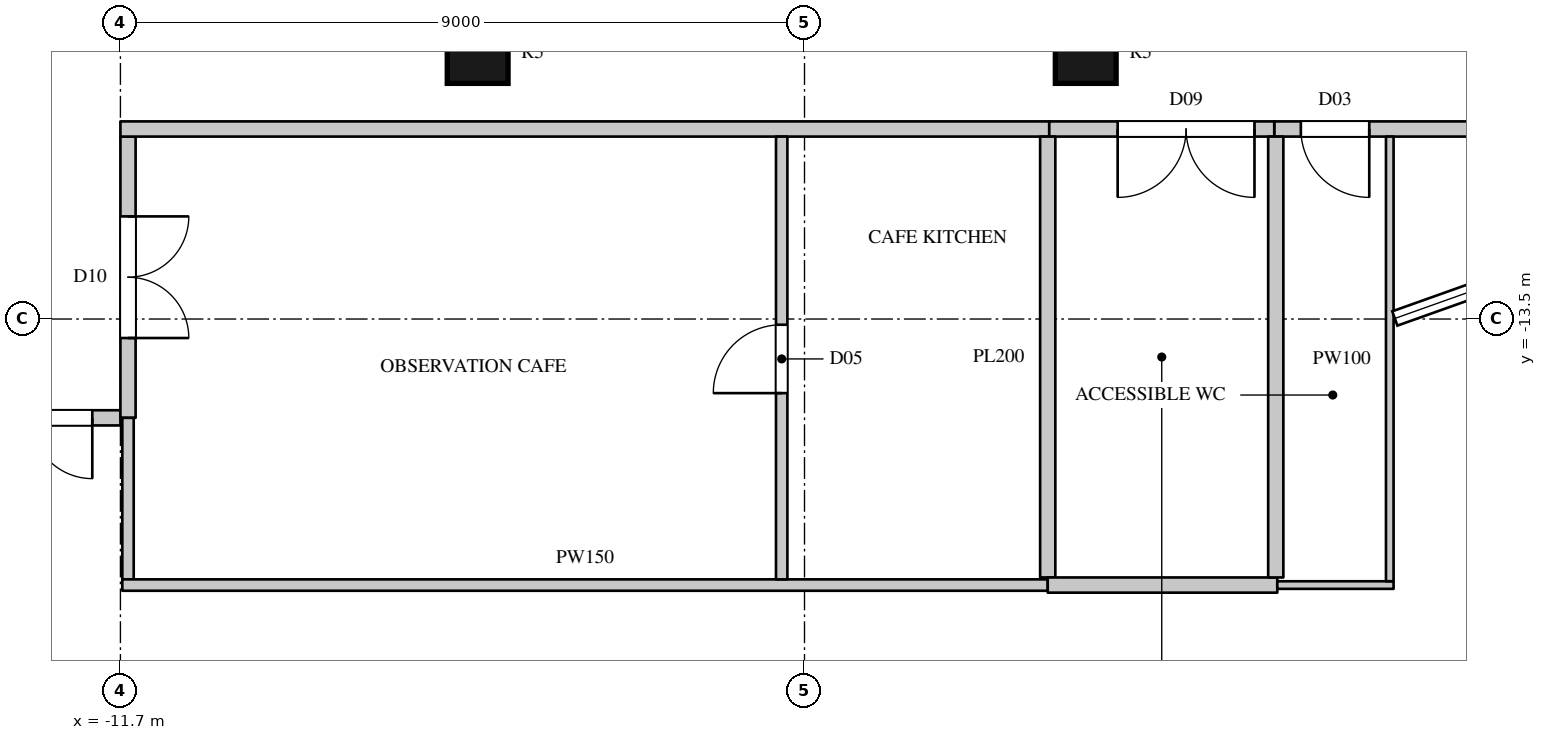
"""IFC4 building model, lengths in metres.
Left out: names, types, materials, properties, quantities, classifications, styles, units other than length and angle.
Written with IfcOpenShell. Run it as: python <this file> out.ifc"""

import sys

from ifc_helpers import new_model, si_unit, direction, frame, frame_2d, origin, origin_2d, place, context, subcontext, project, spatial, rectangle, circle, extrude, element, fill, save


model = new_model("IFC4")
c1 = context("Model", 3, precision=1e-05, world=origin(), true_north=direction((0.0, 1.0)))
c2 = subcontext(c1, "Body", "Model", "MODEL_VIEW")
j1 = project(units=[si_unit("LENGTHUNIT", "METRE"), si_unit("PLANEANGLEUNIT", "RADIAN")], contexts=[c1])
p1 = place(None, origin())
s1 = spatial("IfcSite", under=j1, at=p1, CompositionType="ELEMENT")
p2 = place(p1, origin())
s2 = spatial("IfcBuilding", under=s1, at=p2, CompositionType="ELEMENT")
p3 = place(p2, frame((0.0, 0.0, 329.5)))
s3 = spatial("IfcBuildingStorey", under=s2, at=p3, CompositionType="ELEMENT", Elevation=329.5)
for number, where, z_axis, x_axis in (
    (1, (-7.0, -10.0, 0.0), (0.0, 0.0, 1.0), (1.0, 0.0, 0.0)),
    (2, (1.0, -10.0, 0.0), (0.0, 0.0, 1.0), (1.0, 0.0, 0.0)),
):
    element("IfcColumn", number, at=place(p3, frame(where, z_axis=z_axis, x_axis=x_axis)), inside=s3, PredefinedType="COLUMN", context=c2, shape_type="SweptSolid", body=[
        extrude(circle(Radius=0.4, at=origin_2d()), origin(), (0.0, 0.0, 1.0), 5.5),
    ])
p4 = place(p3, frame((-13.97, -14.8, 0.0), z_axis=(0.0, 0.0, 1.0), x_axis=(1.0, 0.0, 0.0)))
e3 = element("IfcWall", 3, at=p4, inside=s3, PredefinedType="PARTITIONING", context=c2, shape_type="SweptSolid", body=[
    extrude(rectangle(XDim=2.27, YDim=0.2, at=frame_2d((1.135, 0.0))), origin(), (0.0, 0.0, 1.0), 5.098),
])
p5 = place(p4, frame((0.3, 0.0, 0.0)))
e4 = element("IfcOpeningElement", 4, at=p5, cuts=e3, PredefinedType="OPENING", context=c2, shape_type="SweptSolid", body=[
    extrude(rectangle(XDim=1.6, YDim=2.4, at=frame_2d((0.8, 1.2))), frame((0.0, 0.11, 0.0), z_axis=(0.0, -1.0, 0.0), x_axis=(1.0, 0.0, 0.0)), (0.0, 0.0, 1.0), 0.22),
])
p6 = place(p3, frame((-11.6, -14.8, 0.0), z_axis=(0.0, 0.0, 1.0), x_axis=(0.0, 1.0, 0.0)))
e5 = element("IfcWall", 5, at=p6, inside=s3, PredefinedType="PARTITIONING", context=c2, shape_type="SweptSolid", body=[
    extrude(rectangle(XDim=3.7, YDim=0.2, at=frame_2d((1.85, 0.0))), origin(), (0.0, 0.0, 1.0), 5.098),
])
p7 = place(p6, frame((1.05, 0.0, 0.0)))
e6 = element("IfcOpeningElement", 6, at=p7, cuts=e5, PredefinedType="OPENING", context=c2, shape_type="SweptSolid", body=[
    extrude(rectangle(XDim=1.6, YDim=2.4, at=frame_2d((0.8, 1.2))), frame((0.0, 0.11, 0.0), z_axis=(0.0, -1.0, 0.0), x_axis=(1.0, 0.0, 0.0)), (0.0, 0.0, 1.0), 0.22),
])
p8 = place(p3, frame((-11.7, -11.0, 0.0), z_axis=(0.0, 0.0, 1.0), x_axis=(1.0, 0.0, 0.0)))
e7 = element("IfcWall", 7, at=p8, inside=s3, PredefinedType="PARTITIONING", context=c2, shape_type="SweptSolid", body=[
    extrude(rectangle(XDim=12.22, YDim=0.2, at=frame_2d((6.11, 0.0))), origin(), (0.0, 0.0, 1.0), 5.098),
])
p9 = place(p3, frame((3.48, -11.0, 0.0), z_axis=(0.0, 0.0, 1.0), x_axis=(1.0, 0.0, 0.0)))
e8 = element("IfcWall", 8, at=p9, inside=s3, PredefinedType="PARTITIONING", context=c2, shape_type="SweptSolid", body=[
    extrude(rectangle(XDim=6.62, YDim=0.2, at=frame_2d((3.31, 0.0))), origin(), (0.0, 0.0, 1.0), 5.098),
])
p10 = place(p9, frame((0.35, 0.0, 0.0)))
e9 = element("IfcOpeningElement", 9, at=p10, cuts=e8, PredefinedType="OPENING", context=c2, shape_type="SweptSolid", body=[
    extrude(rectangle(XDim=0.9, YDim=2.2, at=frame_2d((0.45, 1.1))), frame((0.0, 0.11, 0.0), z_axis=(0.0, -1.0, 0.0), x_axis=(1.0, 0.0, 0.0)), (0.0, 0.0, 1.0), 0.22),
])
p11 = place(p3, frame((-11.6, -16.925, 0.0), z_axis=(0.0, 0.0, 1.0), x_axis=(0.0, 1.0, 0.0)))
e10 = element("IfcWall", 10, at=p11, inside=s3, PredefinedType="PARTITIONING", context=c2, shape_type="SweptSolid", body=[
    extrude(rectangle(XDim=2.125, YDim=0.15, at=frame_2d((1.062, 0.0))), origin(), (0.0, 0.0, 1.0), 5.098),
])
p12 = place(p3, frame((-11.675, -17.0, 0.0), z_axis=(0.0, 0.0, 1.0), x_axis=(1.0, 0.0, 0.0)))
e11 = element("IfcWall", 11, at=p12, inside=s3, PredefinedType="PARTITIONING", context=c2, shape_type="SweptSolid", body=[
    extrude(rectangle(XDim=12.175, YDim=0.15, at=frame_2d((6.087, 0.0))), origin(), (0.0, 0.0, 1.0), 5.098),
])
p13 = place(p3, frame((-3.0, -16.925, 0.0), z_axis=(0.0, 0.0, 1.0), x_axis=(0.0, 1.0, 0.0)))
e12 = element("IfcWall", 12, at=p13, inside=s3, PredefinedType="PARTITIONING", context=c2, shape_type="SweptSolid", body=[
    extrude(rectangle(XDim=5.825, YDim=0.15, at=frame_2d((2.913, 0.0))), origin(), (0.0, 0.0, 1.0), 5.098),
])
p14 = place(p13, frame((2.45, 0.0, 0.0)))
e13 = element("IfcOpeningElement", 13, at=p14, cuts=e12, PredefinedType="OPENING", context=c2, shape_type="SweptSolid", body=[
    extrude(rectangle(XDim=0.9, YDim=2.2, at=frame_2d((0.45, 1.1))), frame((0.0, 0.085, 0.0), z_axis=(0.0, -1.0, 0.0), x_axis=(1.0, 0.0, 0.0)), (0.0, 0.0, 1.0), 0.17),
])
p15 = place(p3, frame((0.52, -11.0, 0.0), z_axis=(0.0, 0.0, 1.0), x_axis=(1.0, 0.0, 0.0)))
e14 = element("IfcWall", 14, at=p15, inside=s3, PredefinedType="PARTITIONING", context=c2, shape_type="SweptSolid", body=[
    extrude(rectangle(XDim=2.96, YDim=0.2, at=frame_2d((1.48, 0.0))), origin(), (0.0, 0.0, 1.0), 5.098),
])
p16 = place(p15, frame((0.9, 0.0, 0.0)))
e15 = element("IfcOpeningElement", 15, at=p16, cuts=e14, PredefinedType="OPENING", context=c2, shape_type="SweptSolid", body=[
    extrude(rectangle(XDim=1.8, YDim=2.4, at=frame_2d((0.9, 1.2))), frame((0.0, 0.11, 0.0), z_axis=(0.0, -1.0, 0.0), x_axis=(1.0, 0.0, 0.0)), (0.0, 0.0, 1.0), 0.22),
])
p17 = place(p3, frame((0.5, -16.9, 0.0), z_axis=(0.0, 0.0, 1.0), x_axis=(0.0, 1.0, 0.0)))
e16 = element("IfcWall", 16, at=p17, inside=s3, PredefinedType="PARTITIONING", context=c2, shape_type="SweptSolid", body=[
    extrude(rectangle(XDim=5.8, YDim=0.2, at=frame_2d((2.9, 0.0))), origin(), (0.0, 0.0, 1.0), 5.098),
])
p18 = place(p3, frame((0.5, -17.0, 0.0), z_axis=(0.0, 0.0, 1.0), x_axis=(1.0, 0.0, 0.0)))
e17 = element("IfcWall", 17, at=p18, inside=s3, PredefinedType="PARTITIONING", context=c2, shape_type="SweptSolid", body=[
    extrude(rectangle(XDim=3.02, YDim=0.2, at=frame_2d((1.51, 0.0))), origin(), (0.0, 0.0, 1.0), 5.098),
])
p19 = place(p3, frame((3.5, -16.9, 0.0), z_axis=(0.0, 0.0, 1.0), x_axis=(0.0, 1.0, 0.0)))
e18 = element("IfcWall", 18, at=p19, inside=s3, PredefinedType="PARTITIONING", context=c2, shape_type="SweptSolid", body=[
    extrude(rectangle(XDim=5.8, YDim=0.2, at=frame_2d((2.9, 0.0))), origin(), (0.0, 0.0, 1.0), 5.098),
])
p20 = place(p3, frame((3.52, -17.0, 0.0), z_axis=(0.0, 0.0, 1.0), x_axis=(1.0, 0.0, 0.0)))
e19 = element("IfcWall", 19, at=p20, inside=s3, PredefinedType="PARTITIONING", context=c2, shape_type="SweptSolid", body=[
    extrude(rectangle(XDim=1.53, YDim=0.1, at=frame_2d((0.765, 0.0))), origin(), (0.0, 0.0, 1.0), 5.098),
])
p21 = place(p3, frame((5.0, -16.95, 0.0), z_axis=(0.0, 0.0, 1.0), x_axis=(0.0, 1.0, 0.0)))
e20 = element("IfcWall", 20, at=p21, inside=s3, PredefinedType="PARTITIONING", context=c2, shape_type="SweptSolid", body=[
    extrude(rectangle(XDim=5.85, YDim=0.1, at=frame_2d((2.925, 0.0))), origin(), (0.0, 0.0, 1.0), 5.098),
])
p22 = place(p10, origin())
e21 = element("IfcDoor", 21, at=p22, inside=s3, OperationType="SINGLE_SWING_LEFT", PredefinedType="DOOR", context=c2, shape_type="SweptSolid", body=[
    extrude(rectangle(XDim=0.9, YDim=2.2, at=frame_2d((0.45, 1.1))), frame((0.0, 0.025, 0.0), z_axis=(0.0, -1.0, 0.0), x_axis=(1.0, 0.0, 0.0)), (0.0, 0.0, 1.0), 0.05),
])
fill(e9, e21)
p23 = place(p16, origin())
e22 = element("IfcDoor", 22, at=p23, inside=s3, OperationType="DOUBLE_DOOR_SINGLE_SWING", PredefinedType="DOOR", context=c2, shape_type="SweptSolid", body=[
    extrude(rectangle(XDim=1.8, YDim=2.4, at=frame_2d((0.9, 1.2))), frame((0.0, 0.025, 0.0), z_axis=(0.0, -1.0, 0.0), x_axis=(1.0, 0.0, 0.0)), (0.0, 0.0, 1.0), 0.05),
])
fill(e15, e22)
p24 = place(p7, origin())
e23 = element("IfcDoor", 23, at=p24, inside=s3, OperationType="DOUBLE_DOOR_SINGLE_SWING", PredefinedType="DOOR", context=c2, shape_type="SweptSolid", body=[
    extrude(rectangle(XDim=1.6, YDim=2.4, at=frame_2d((0.8, 1.2))), frame((0.0, 0.025, 0.0), z_axis=(0.0, -1.0, 0.0), x_axis=(1.0, 0.0, 0.0)), (0.0, 0.0, 1.0), 0.05),
])
fill(e6, e23)
p25 = place(p14, origin())
e24 = element("IfcDoor", 24, at=p25, inside=s3, OperationType="SINGLE_SWING_LEFT", PredefinedType="DOOR", context=c2, shape_type="SweptSolid", body=[
    extrude(rectangle(XDim=0.9, YDim=2.2, at=frame_2d((0.45, 1.1))), frame((0.0, 0.025, 0.0), z_axis=(0.0, -1.0, 0.0), x_axis=(1.0, 0.0, 0.0)), (0.0, 0.0, 1.0), 0.05),
])
fill(e13, e24)
p26 = place(p5, origin())
e25 = element("IfcDoor", 25, at=p26, inside=s3, OperationType="DOUBLE_DOOR_SINGLE_SWING", PredefinedType="DOOR", context=c2, shape_type="SweptSolid", body=[
    extrude(rectangle(XDim=1.6, YDim=2.4, at=frame_2d((0.8, 1.2))), frame((0.0, 0.025, 0.0), z_axis=(0.0, -1.0, 0.0), x_axis=(1.0, 0.0, 0.0)), (0.0, 0.0, 1.0), 0.05),
])
fill(e4, e25)
save(model, sys.argv[1])
